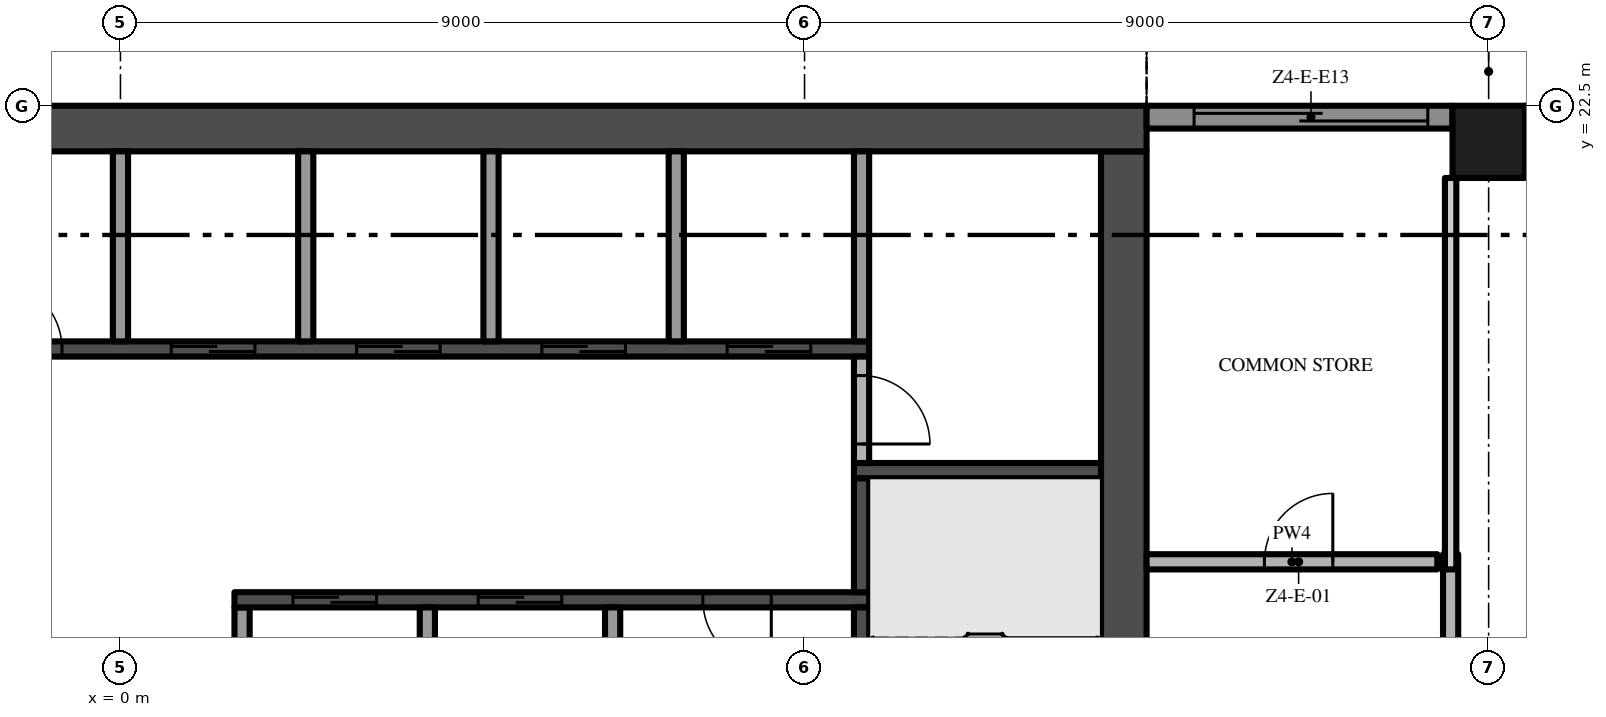
"""IFC4 building model, lengths in metres.
Left out: names, types, materials, properties, quantities, classifications, styles, units other than length and angle.
Written with IfcOpenShell. Run it as: python <this file> out.ifc"""

import sys

from ifc_helpers import new_model, si_unit, direction, frame, frame_2d, origin, origin_2d, place, context, subcontext, project, spatial, polyline, rectangle, outline, extrude, element, fill, save


model = new_model("IFC4")
c1 = context("Model", 3, precision=1e-05, world=origin(), true_north=direction((0.0, 1.0)))
c2 = subcontext(c1, "Body", "Model", "MODEL_VIEW")
j1 = project(units=[si_unit("LENGTHUNIT", "METRE"), si_unit("PLANEANGLEUNIT", "RADIAN")], contexts=[c1])
p1 = place(None, origin())
s1 = spatial("IfcSite", under=j1, at=p1, CompositionType="ELEMENT")
p2 = place(p1, origin())
s2 = spatial("IfcBuilding", under=s1, at=p2, CompositionType="ELEMENT")
p3 = place(p2, frame((0.0, 0.0, 230.0)))
s3 = spatial("IfcBuildingStorey", under=s2, at=p3, CompositionType="ELEMENT", Elevation=230.0)
p4 = place(p3, frame((13.2, 5.1, -0.3), z_axis=(0.0, 0.0, 1.0), x_axis=(0.0, 1.0, 0.0)))
e1 = element("IfcWall", 1, at=p4, inside=s3, PredefinedType="SHEAR", context=c2, shape_type="SweptSolid", body=[
    extrude(rectangle(XDim=16.8, YDim=0.6, at=frame_2d((8.4, 0.0))), origin(), (0.0, 0.0, 1.0), 3.8),
])
p5 = place(p4, frame((6.3, 0.0, 0.3)))
e2 = element("IfcOpeningElement", 2, at=p5, cuts=e1, PredefinedType="OPENING", context=c2, shape_type="SweptSolid", body=[
    extrude(rectangle(XDim=1.2, YDim=2.2, at=frame_2d((0.6, 1.1))), frame((0.0, 0.31, 0.0), z_axis=(0.0, -1.0, 0.0), x_axis=(1.0, 0.0, 0.0)), (0.0, 0.0, 1.0), 0.62),
])
p6 = place(p3, frame((13.5, 22.2, -0.3), z_axis=(0.0, 0.0, 1.0), x_axis=(-1.0, 0.0, 0.0)))
e3 = element("IfcWall", 3, at=p6, inside=s3, PredefinedType="SHEAR", context=c2, shape_type="SweptSolid", body=[
    extrude(rectangle(XDim=27.0, YDim=0.6, at=frame_2d((13.5, 0.0))), origin(), (0.0, 0.0, 1.0), 3.8),
])
p7 = place(p3, frame((18.0, 22.025, 0.0), z_axis=(0.0, 0.0, 1.0), x_axis=(1.0, 0.0, 0.0)))
e4 = element("IfcColumn", 4, at=p7, inside=s3, PredefinedType="COLUMN", context=c2, shape_type="SweptSolid", body=[
    extrude(rectangle(XDim=0.95, YDim=0.95, at=origin_2d()), origin(), (0.0, 0.0, 1.0), 3.5),
])
p8 = place(p3, frame((18.475, 22.35, 0.0), z_axis=(0.0, 0.0, 1.0), x_axis=(1.0, 0.0, 0.0)))
e5 = element("IfcWall", 5, at=p8, inside=s3, PredefinedType="SOLIDWALL", context=c2, shape_type="SweptSolid", body=[
    extrude(rectangle(XDim=3.725, YDim=0.3, at=frame_2d((1.863, 0.0))), origin(), (0.0, 0.0, 1.0), 3.5),
])
p9 = place(p8, frame((0.325, 0.0, 0.45)))
e6 = element("IfcOpeningElement", 6, at=p9, cuts=e5, PredefinedType="OPENING", context=c2, shape_type="SweptSolid", body=[
    extrude(rectangle(XDim=3.075, YDim=2.65, at=frame_2d((1.538, 1.325))), frame((0.0, 0.16, 0.0), z_axis=(0.0, -1.0, 0.0), x_axis=(1.0, 0.0, 0.0)), (0.0, 0.0, 1.0), 0.32),
])
p10 = place(p3, frame((13.5, 22.35, 0.0), z_axis=(0.0, 0.0, 1.0), x_axis=(1.0, 0.0, 0.0)))
e7 = element("IfcWall", 7, at=p10, inside=s3, PredefinedType="SOLIDWALL", context=c2, shape_type="SweptSolid", body=[
    extrude(rectangle(XDim=4.025, YDim=0.3, at=frame_2d((2.013, 0.0))), origin(), (0.0, 0.0, 1.0), 3.5),
])
p11 = place(p10, frame((0.625, 0.0, 0.0)))
e8 = element("IfcOpeningElement", 8, at=p11, cuts=e7, PredefinedType="OPENING", context=c2, shape_type="SweptSolid", body=[
    extrude(rectangle(XDim=3.075, YDim=2.4, at=frame_2d((1.538, 1.2))), frame((0.0, 0.16, 0.0), z_axis=(0.0, -1.0, 0.0), x_axis=(1.0, 0.0, 0.0)), (0.0, 0.0, 1.0), 0.32),
])
p12 = place(p3, origin())
e9 = element("IfcWall", 9, at=p12, inside=s3, PredefinedType="USERDEFINED", context=c2, shape_type="SweptSolid", body=[
    extrude(outline(polyline([(22.5, 23.451), (21.0, 23.115), (20.625, 23.1), (19.5, 23.231), (18.0, 23.755), (16.5, 24.488), (15.0, 25.149), (13.5, 25.485), (13.445, 25.241), (14.921, 24.91), (16.395, 24.261), (17.904, 23.524), (19.444, 22.986), (20.615, 22.849), (21.033, 22.866), (22.555, 23.208), (22.5, 23.451)])), origin(), (0.0, 0.0, 1.0), 0.9),
])
p13 = place(p3, frame((-9.85, 19.3, 0.0), z_axis=(0.0, 0.0, 1.0), x_axis=(1.0, 0.0, 0.0)))
e10 = element("IfcWall", 10, at=p13, inside=s3, PredefinedType="SHEAR", context=c2, shape_type="SweptSolid", body=[
    extrude(rectangle(XDim=19.7, YDim=0.2, at=frame_2d((9.85, 0.0))), origin(), (0.0, 0.0, 1.0), 3.5),
])
p14 = place(p13, frame((10.519, 0.0, 0.0)))
e11 = element("IfcOpeningElement", 11, at=p14, cuts=e10, PredefinedType="OPENING", context=c2, shape_type="SweptSolid", body=[
    extrude(rectangle(XDim=1.1, YDim=2.1, at=frame_2d((0.55, 1.05))), frame((0.0, 0.11, 0.0), z_axis=(0.0, -1.0, 0.0), x_axis=(1.0, 0.0, 0.0)), (0.0, 0.0, 1.0), 0.22),
])
p15 = place(p13, frame((12.956, 0.0, 0.0)))
e12 = element("IfcOpeningElement", 12, at=p15, cuts=e10, PredefinedType="OPENING", context=c2, shape_type="SweptSolid", body=[
    extrude(rectangle(XDim=1.1, YDim=2.1, at=frame_2d((0.55, 1.05))), frame((0.0, 0.11, 0.0), z_axis=(0.0, -1.0, 0.0), x_axis=(1.0, 0.0, 0.0)), (0.0, 0.0, 1.0), 0.22),
])
p16 = place(p13, frame((15.394, 0.0, 0.0)))
e13 = element("IfcOpeningElement", 13, at=p16, cuts=e10, PredefinedType="OPENING", context=c2, shape_type="SweptSolid", body=[
    extrude(rectangle(XDim=1.1, YDim=2.1, at=frame_2d((0.55, 1.05))), frame((0.0, 0.11, 0.0), z_axis=(0.0, -1.0, 0.0), x_axis=(1.0, 0.0, 0.0)), (0.0, 0.0, 1.0), 0.22),
])
p17 = place(p13, frame((17.831, 0.0, 0.0)))
e14 = element("IfcOpeningElement", 14, at=p17, cuts=e10, PredefinedType="OPENING", context=c2, shape_type="SweptSolid", body=[
    extrude(rectangle(XDim=1.1, YDim=2.1, at=frame_2d((0.55, 1.05))), frame((0.0, 0.11, 0.0), z_axis=(0.0, -1.0, 0.0), x_axis=(1.0, 0.0, 0.0)), (0.0, 0.0, 1.0), 0.22),
])
p18 = place(p13, frame((0.869, 0.0, 0.0)))
e15 = element("IfcOpeningElement", 15, at=p18, cuts=e10, PredefinedType="OPENING", context=c2, shape_type="SweptSolid", body=[
    extrude(rectangle(XDim=0.9, YDim=2.1, at=frame_2d((0.45, 1.05))), frame((0.0, 0.11, 0.0), z_axis=(0.0, -1.0, 0.0), x_axis=(1.0, 0.0, 0.0)), (0.0, 0.0, 1.0), 0.22),
])
p19 = place(p13, frame((4.525, 0.0, 0.0)))
e16 = element("IfcOpeningElement", 16, at=p19, cuts=e10, PredefinedType="OPENING", context=c2, shape_type="SweptSolid", body=[
    extrude(rectangle(XDim=0.9, YDim=2.1, at=frame_2d((0.45, 1.05))), frame((0.0, 0.11, 0.0), z_axis=(0.0, -1.0, 0.0), x_axis=(1.0, 0.0, 0.0)), (0.0, 0.0, 1.0), 0.22),
])
p20 = place(p13, frame((8.181, 0.0, 0.0)))
e17 = element("IfcOpeningElement", 17, at=p20, cuts=e10, PredefinedType="OPENING", context=c2, shape_type="SweptSolid", body=[
    extrude(rectangle(XDim=0.9, YDim=2.1, at=frame_2d((0.45, 1.05))), frame((0.0, 0.11, 0.0), z_axis=(0.0, -1.0, 0.0), x_axis=(1.0, 0.0, 0.0)), (0.0, 0.0, 1.0), 0.22),
])
p21 = place(p3, frame((0.0, 19.4, 0.0), z_axis=(0.0, 0.0, 1.0), x_axis=(0.0, 1.0, 0.0)))
e18 = element("IfcWall", 18, at=p21, inside=s3, PredefinedType="PARTITIONING", context=c2, shape_type="SweptSolid", body=[
    extrude(rectangle(XDim=2.5, YDim=0.2, at=frame_2d((1.25, 0.0))), origin(), (0.0, 0.0, 1.0), 3.5),
])
p22 = place(p3, frame((1.6, 13.7, 0.0), z_axis=(0.0, 0.0, 1.0), x_axis=(0.0, 1.0, 0.0)))
e19 = element("IfcWall", 19, at=p22, inside=s3, PredefinedType="PARTITIONING", context=c2, shape_type="SweptSolid", body=[
    extrude(rectangle(XDim=2.2, YDim=0.2, at=frame_2d((1.1, 0.0))), origin(), (0.0, 0.0, 1.0), 3.5),
])
p23 = place(p3, frame((9.85, 16.0, 0.0), z_axis=(0.0, 0.0, 1.0), x_axis=(-1.0, 0.0, 0.0)))
e20 = element("IfcWall", 20, at=p23, inside=s3, PredefinedType="SHEAR", context=c2, shape_type="SweptSolid", body=[
    extrude(rectangle(XDim=8.35, YDim=0.2, at=frame_2d((4.175, 0.0))), origin(), (0.0, 0.0, 1.0), 3.5),
])
p24 = place(p23, frame((6.481, 0.0, 0.0)))
e21 = element("IfcOpeningElement", 21, at=p24, cuts=e20, PredefinedType="OPENING", context=c2, shape_type="SweptSolid", body=[
    extrude(rectangle(XDim=1.1, YDim=2.1, at=frame_2d((0.55, 1.05))), frame((0.0, 0.11, 0.0), z_axis=(0.0, -1.0, 0.0), x_axis=(1.0, 0.0, 0.0)), (0.0, 0.0, 1.0), 0.22),
])
p25 = place(p23, frame((4.044, 0.0, 0.0)))
e22 = element("IfcOpeningElement", 22, at=p25, cuts=e20, PredefinedType="OPENING", context=c2, shape_type="SweptSolid", body=[
    extrude(rectangle(XDim=1.1, YDim=2.1, at=frame_2d((0.55, 1.05))), frame((0.0, 0.11, 0.0), z_axis=(0.0, -1.0, 0.0), x_axis=(1.0, 0.0, 0.0)), (0.0, 0.0, 1.0), 0.22),
])
p26 = place(p23, frame((1.288, 0.0, 0.0)))
e23 = element("IfcOpeningElement", 23, at=p26, cuts=e20, PredefinedType="OPENING", context=c2, shape_type="SweptSolid", body=[
    extrude(rectangle(XDim=0.9, YDim=2.1, at=frame_2d((0.45, 1.05))), frame((0.0, 0.11, 0.0), z_axis=(0.0, -1.0, 0.0), x_axis=(1.0, 0.0, 0.0)), (0.0, 0.0, 1.0), 0.22),
])
p27 = place(p3, frame((2.438, 19.4, 0.0), z_axis=(0.0, 0.0, 1.0), x_axis=(0.0, 1.0, 0.0)))
e24 = element("IfcWall", 24, at=p27, inside=s3, PredefinedType="PARTITIONING", context=c2, shape_type="SweptSolid", body=[
    extrude(rectangle(XDim=2.5, YDim=0.2, at=frame_2d((1.25, 0.0))), origin(), (0.0, 0.0, 1.0), 3.5),
])
p28 = place(p3, frame((4.037, 13.7, 0.0), z_axis=(0.0, 0.0, 1.0), x_axis=(0.0, 1.0, 0.0)))
e25 = element("IfcWall", 25, at=p28, inside=s3, PredefinedType="PARTITIONING", context=c2, shape_type="SweptSolid", body=[
    extrude(rectangle(XDim=2.2, YDim=0.2, at=frame_2d((1.1, 0.0))), origin(), (0.0, 0.0, 1.0), 3.5),
])
p29 = place(p3, frame((4.875, 19.4, 0.0), z_axis=(0.0, 0.0, 1.0), x_axis=(0.0, 1.0, 0.0)))
e26 = element("IfcWall", 26, at=p29, inside=s3, PredefinedType="PARTITIONING", context=c2, shape_type="SweptSolid", body=[
    extrude(rectangle(XDim=2.5, YDim=0.2, at=frame_2d((1.25, 0.0))), origin(), (0.0, 0.0, 1.0), 3.5),
])
p30 = place(p3, frame((6.475, 13.7, 0.0), z_axis=(0.0, 0.0, 1.0), x_axis=(0.0, 1.0, 0.0)))
e27 = element("IfcWall", 27, at=p30, inside=s3, PredefinedType="PARTITIONING", context=c2, shape_type="SweptSolid", body=[
    extrude(rectangle(XDim=2.2, YDim=0.2, at=frame_2d((1.1, 0.0))), origin(), (0.0, 0.0, 1.0), 3.5),
])
p31 = place(p3, frame((7.312, 19.4, 0.0), z_axis=(0.0, 0.0, 1.0), x_axis=(0.0, 1.0, 0.0)))
e28 = element("IfcWall", 28, at=p31, inside=s3, PredefinedType="PARTITIONING", context=c2, shape_type="SweptSolid", body=[
    extrude(rectangle(XDim=2.5, YDim=0.2, at=frame_2d((1.25, 0.0))), origin(), (0.0, 0.0, 1.0), 3.5),
])
p32 = place(p3, frame((9.75, 12.3, 0.0), z_axis=(0.0, 0.0, 1.0), x_axis=(0.0, 1.0, 0.0)))
e29 = element("IfcWall", 29, at=p32, inside=s3, PredefinedType="SHEAR", context=c2, shape_type="SweptSolid", body=[
    extrude(rectangle(XDim=3.6, YDim=0.2, at=frame_2d((1.8, 0.0))), origin(), (0.0, 0.0, 1.0), 3.5),
])
p33 = place(p3, frame((9.75, 16.1, 0.0), z_axis=(0.0, 0.0, 1.0), x_axis=(0.0, 1.0, 0.0)))
e30 = element("IfcWall", 30, at=p33, inside=s3, PredefinedType="SHEAR", context=c2, shape_type="SweptSolid", body=[
    extrude(rectangle(XDim=1.5, YDim=0.2, at=frame_2d((0.75, 0.0))), origin(), (0.0, 0.0, 1.0), 3.5),
])
p34 = place(p3, frame((9.65, 17.7, 0.0), z_axis=(0.0, 0.0, 1.0), x_axis=(1.0, 0.0, 0.0)))
e31 = element("IfcWall", 31, at=p34, inside=s3, PredefinedType="SHEAR", context=c2, shape_type="SweptSolid", body=[
    extrude(rectangle(XDim=3.25, YDim=0.2, at=frame_2d((1.625, 0.0))), origin(), (0.0, 0.0, 1.0), 3.5),
])
p35 = place(p3, frame((9.75, 19.2, 0.0), z_axis=(0.0, 0.0, 1.0), x_axis=(0.0, -1.0, 0.0)))
e32 = element("IfcWall", 32, at=p35, inside=s3, PredefinedType="PARTITIONING", context=c2, shape_type="SweptSolid", body=[
    extrude(rectangle(XDim=1.4, YDim=0.2, at=frame_2d((0.7, 0.0))), origin(), (0.0, 0.0, 1.0), 3.5),
])
p36 = place(p35, frame((0.25, 0.0, 0.0)))
e33 = element("IfcOpeningElement", 33, at=p36, cuts=e32, PredefinedType="OPENING", context=c2, shape_type="SweptSolid", body=[
    extrude(rectangle(XDim=0.9, YDim=2.1, at=frame_2d((0.45, 1.05))), frame((0.0, 0.11, 0.0), z_axis=(0.0, -1.0, 0.0), x_axis=(1.0, 0.0, 0.0)), (0.0, 0.0, 1.0), 0.22),
])
p37 = place(p3, frame((9.75, 19.4, 0.0), z_axis=(0.0, 0.0, 1.0), x_axis=(0.0, 1.0, 0.0)))
e34 = element("IfcWall", 34, at=p37, inside=s3, PredefinedType="PARTITIONING", context=c2, shape_type="SweptSolid", body=[
    extrude(rectangle(XDim=2.5, YDim=0.2, at=frame_2d((1.25, 0.0))), origin(), (0.0, 0.0, 1.0), 3.5),
])
p38 = place(p3, frame((13.5, 16.5, 0.0), z_axis=(0.0, 0.0, 1.0), x_axis=(1.0, 0.0, 0.0)))
e35 = element("IfcWall", 35, at=p38, inside=s3, PredefinedType="PARTITIONING", context=c2, shape_type="SweptSolid", body=[
    extrude(rectangle(XDim=3.825, YDim=0.2, at=frame_2d((1.913, 0.0))), origin(), (0.0, 0.0, 1.0), 3.5),
])
p39 = place(p38, frame((1.55, 0.0, 0.0)))
e36 = element("IfcOpeningElement", 36, at=p39, cuts=e35, PredefinedType="OPENING", context=c2, shape_type="SweptSolid", body=[
    extrude(rectangle(XDim=0.9, YDim=2.1, at=frame_2d((0.45, 1.05))), frame((0.0, 0.11, 0.0), z_axis=(0.0, -1.0, 0.0), x_axis=(1.0, 0.0, 0.0)), (0.0, 0.0, 1.0), 0.22),
])
p40 = place(p3, frame((17.5, 16.6, 0.0), z_axis=(0.0, 0.0, 1.0), x_axis=(0.0, -1.0, 0.0)))
e37 = element("IfcWall", 37, at=p40, inside=s3, PredefinedType="PARTITIONING", context=c2, shape_type="SweptSolid", body=[
    extrude(rectangle(XDim=2.575, YDim=0.2, at=frame_2d((1.288, 0.0))), origin(), (0.0, 0.0, 1.0), 3.5),
])
p41 = place(p40, frame((1.225, 0.0, 0.0)))
e38 = element("IfcOpeningElement", 38, at=p41, cuts=e37, PredefinedType="OPENING", context=c2, shape_type="SweptSolid", body=[
    extrude(rectangle(XDim=1.2, YDim=2.4, at=frame_2d((0.6, 1.2))), frame((0.0, 0.11, 0.0), z_axis=(0.0, -1.0, 0.0), x_axis=(1.0, 0.0, 0.0)), (0.0, 0.0, 1.0), 0.22),
])
p42 = place(p3, frame((17.5, 16.4, 0.0), z_axis=(0.0, 0.0, 1.0), x_axis=(0.0, 1.0, 0.0)))
e39 = element("IfcWall", 39, at=p42, inside=s3, PredefinedType="PARTITIONING", context=c2, shape_type="SweptSolid", body=[
    extrude(rectangle(XDim=5.15, YDim=0.15, at=frame_2d((2.575, 0.0))), origin(), (0.0, 0.0, 1.0), 3.5),
])
p43 = place(p11, origin())
e40 = element("IfcDoor", 40, at=p43, inside=s3, OperationType="SINGLE_SWING_LEFT", PredefinedType="DOOR", context=c2, shape_type="SweptSolid", body=[
    extrude(rectangle(XDim=3.075, YDim=2.4, at=frame_2d((1.538, 1.2))), frame((0.0, 0.025, 0.0), z_axis=(0.0, -1.0, 0.0), x_axis=(1.0, 0.0, 0.0)), (0.0, 0.0, 1.0), 0.05),
])
fill(e8, e40)
p44 = place(p14, origin())
e41 = element("IfcDoor", 41, at=p44, inside=s3, OperationType="SLIDING_TO_RIGHT", PredefinedType="DOOR", context=c2, shape_type="SweptSolid", body=[
    extrude(rectangle(XDim=1.1, YDim=2.1, at=frame_2d((0.55, 1.05))), frame((0.0, 0.025, 0.0), z_axis=(0.0, -1.0, 0.0), x_axis=(1.0, 0.0, 0.0)), (0.0, 0.0, 1.0), 0.05),
])
fill(e11, e41)
p45 = place(p15, origin())
e42 = element("IfcDoor", 42, at=p45, inside=s3, OperationType="SLIDING_TO_RIGHT", PredefinedType="DOOR", context=c2, shape_type="SweptSolid", body=[
    extrude(rectangle(XDim=1.1, YDim=2.1, at=frame_2d((0.55, 1.05))), frame((0.0, 0.025, 0.0), z_axis=(0.0, -1.0, 0.0), x_axis=(1.0, 0.0, 0.0)), (0.0, 0.0, 1.0), 0.05),
])
fill(e12, e42)
p46 = place(p16, origin())
e43 = element("IfcDoor", 43, at=p46, inside=s3, OperationType="SLIDING_TO_RIGHT", PredefinedType="DOOR", context=c2, shape_type="SweptSolid", body=[
    extrude(rectangle(XDim=1.1, YDim=2.1, at=frame_2d((0.55, 1.05))), frame((0.0, 0.025, 0.0), z_axis=(0.0, -1.0, 0.0), x_axis=(1.0, 0.0, 0.0)), (0.0, 0.0, 1.0), 0.05),
])
fill(e13, e43)
p47 = place(p17, origin())
e44 = element("IfcDoor", 44, at=p47, inside=s3, OperationType="SLIDING_TO_RIGHT", PredefinedType="DOOR", context=c2, shape_type="SweptSolid", body=[
    extrude(rectangle(XDim=1.1, YDim=2.1, at=frame_2d((0.55, 1.05))), frame((0.0, 0.025, 0.0), z_axis=(0.0, -1.0, 0.0), x_axis=(1.0, 0.0, 0.0)), (0.0, 0.0, 1.0), 0.05),
])
fill(e14, e44)
p48 = place(p24, origin())
e45 = element("IfcDoor", 45, at=p48, inside=s3, OperationType="SLIDING_TO_RIGHT", PredefinedType="DOOR", context=c2, shape_type="SweptSolid", body=[
    extrude(rectangle(XDim=1.1, YDim=2.1, at=frame_2d((0.55, 1.05))), frame((0.0, 0.025, 0.0), z_axis=(0.0, -1.0, 0.0), x_axis=(1.0, 0.0, 0.0)), (0.0, 0.0, 1.0), 0.05),
])
fill(e21, e45)
p49 = place(p25, origin())
e46 = element("IfcDoor", 46, at=p49, inside=s3, OperationType="SLIDING_TO_RIGHT", PredefinedType="DOOR", context=c2, shape_type="SweptSolid", body=[
    extrude(rectangle(XDim=1.1, YDim=2.1, at=frame_2d((0.55, 1.05))), frame((0.0, 0.025, 0.0), z_axis=(0.0, -1.0, 0.0), x_axis=(1.0, 0.0, 0.0)), (0.0, 0.0, 1.0), 0.05),
])
fill(e22, e46)
p50 = place(p26, origin())
e47 = element("IfcDoor", 47, at=p50, inside=s3, OperationType="SINGLE_SWING_LEFT", PredefinedType="DOOR", context=c2, shape_type="SweptSolid", body=[
    extrude(rectangle(XDim=0.9, YDim=2.1, at=frame_2d((0.45, 1.05))), frame((0.0, 0.025, 0.0), z_axis=(0.0, -1.0, 0.0), x_axis=(1.0, 0.0, 0.0)), (0.0, 0.0, 1.0), 0.05),
])
fill(e23, e47)
p51 = place(p36, origin())
e48 = element("IfcDoor", 48, at=p51, inside=s3, OperationType="SINGLE_SWING_RIGHT", PredefinedType="DOOR", context=c2, shape_type="SweptSolid", body=[
    extrude(rectangle(XDim=0.9, YDim=2.1, at=frame_2d((0.45, 1.05))), frame((0.0, 0.025, 0.0), z_axis=(0.0, -1.0, 0.0), x_axis=(1.0, 0.0, 0.0)), (0.0, 0.0, 1.0), 0.05),
])
fill(e33, e48)
p52 = place(p20, origin())
e49 = element("IfcDoor", 49, at=p52, inside=s3, OperationType="SINGLE_SWING_LEFT", PredefinedType="DOOR", context=c2, shape_type="SweptSolid", body=[
    extrude(rectangle(XDim=0.9, YDim=2.1, at=frame_2d((0.45, 1.05))), frame((0.0, 0.025, 0.0), z_axis=(0.0, -1.0, 0.0), x_axis=(1.0, 0.0, 0.0)), (0.0, 0.0, 1.0), 0.05),
])
fill(e17, e49)
p53 = place(p39, origin())
e50 = element("IfcDoor", 50, at=p53, inside=s3, OperationType="SINGLE_SWING_RIGHT", PredefinedType="DOOR", context=c2, shape_type="SweptSolid", body=[
    extrude(rectangle(XDim=0.9, YDim=2.1, at=frame_2d((0.45, 1.05))), frame((0.0, 0.025, 0.0), z_axis=(0.0, -1.0, 0.0), x_axis=(1.0, 0.0, 0.0)), (0.0, 0.0, 1.0), 0.05),
])
fill(e36, e50)
save(model, sys.argv[1])
